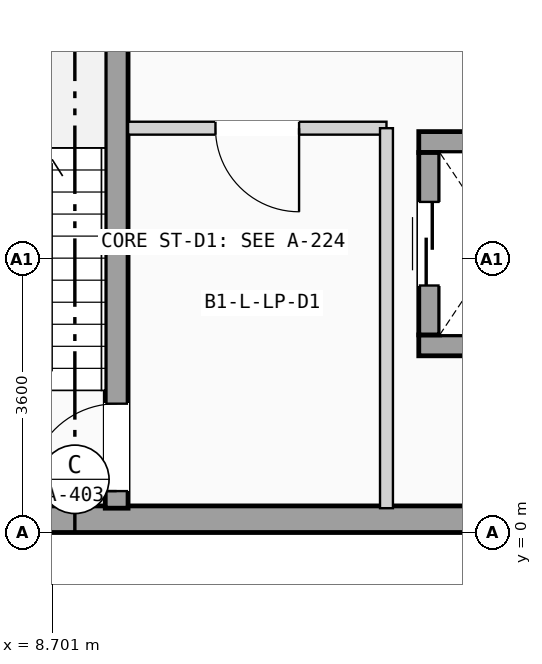
"""IFC4 building model, lengths in metres.
Left out: names, types, materials, properties, quantities, classifications, styles, units other than length and angle.
Written with IfcOpenShell. Run it as: python <this file> out.ifc"""

import sys

from ifc_helpers import new_model, si_unit, direction, frame, frame_2d, origin, place, context, subcontext, project, spatial, rectangle, extrude, element, fill, save


model = new_model("IFC4")
c1 = context("Model", 3, precision=1e-05, world=origin(), true_north=direction((0.0, 1.0)))
c2 = subcontext(c1, "Body", "Model", "MODEL_VIEW")
j1 = project(units=[si_unit("LENGTHUNIT", "METRE"), si_unit("PLANEANGLEUNIT", "RADIAN")], contexts=[c1])
p1 = place(None, origin())
s1 = spatial("IfcSite", under=j1, at=p1, CompositionType="ELEMENT")
p2 = place(p1, origin())
s2 = spatial("IfcBuilding", under=s1, at=p2, CompositionType="ELEMENT")
p3 = place(p2, frame((0.0, 0.0, -4.2)))
s3 = spatial("IfcBuildingStorey", under=s2, at=p3, CompositionType="ELEMENT", Elevation=-4.2)
p4 = place(p3, frame((0.0, 0.175, 0.0), z_axis=(0.0, 0.0, 1.0), x_axis=(1.0, 0.0, 0.0)))
e1 = element("IfcWall", 1, at=p4, inside=s3, PredefinedType="SOLIDWALL", context=c2, shape_type="SweptSolid", body=[
    extrude(rectangle(XDim=64.8, YDim=0.35, at=frame_2d((32.4, 0.0))), origin(), (0.0, 0.0, 1.0), 3.92),
])
p5 = place(p3, frame((9.55, 0.32, 0.0), z_axis=(0.0, 0.0, 1.0), x_axis=(0.0, 1.0, 0.0)))
e2 = element("IfcWall", 2, at=p5, inside=s3, PredefinedType="SHEAR", context=c2, shape_type="SweptSolid", body=[
    extrude(rectangle(XDim=7.0, YDim=0.3, at=frame_2d((3.5, 0.0))), origin(), (0.0, 0.0, 1.0), 3.92),
])
p6 = place(p5, frame((0.225, 0.0, 0.0)))
e3 = element("IfcOpeningElement", 3, at=p6, cuts=e2, PredefinedType="OPENING", context=c2, shape_type="SweptSolid", body=[
    extrude(rectangle(XDim=1.15, YDim=2.12, at=frame_2d((0.575, 1.06))), frame((0.0, 0.16, 0.0), z_axis=(0.0, -1.0, 0.0), x_axis=(1.0, 0.0, 0.0)), (0.0, 0.0, 1.0), 0.32),
])
for number, where, z_axis, x_axis in (
    (4, (13.525, 2.462, 0.0), (0.0, 0.0, 1.0), (1.0, 0.0, 0.0)),
    (5, (13.525, 5.137, 0.0), (0.0, 0.0, 1.0), (1.0, 0.0, 0.0)),
):
    element("IfcWall", number, at=place(p3, frame(where, z_axis=z_axis, x_axis=x_axis)), inside=s3, PredefinedType="SHEAR", context=c2, shape_type="SweptSolid", body=[
        extrude(rectangle(XDim=2.15, YDim=0.275, at=frame_2d((1.075, 0.0))), origin(), (0.0, 0.0, 1.0), 3.92),
    ])
p7 = place(p3, frame((13.663, 2.6, 0.0), z_axis=(0.0, 0.0, 1.0), x_axis=(0.0, 1.0, 0.0)))
e6 = element("IfcWall", 6, at=p7, inside=s3, PredefinedType="SHEAR", context=c2, shape_type="SweptSolid", body=[
    extrude(rectangle(XDim=2.4, YDim=0.275, at=frame_2d((1.2, 0.0))), origin(), (0.0, 0.0, 1.0), 3.92),
])
p8 = place(p7, frame((0.65, 0.0, 0.0)))
e7 = element("IfcOpeningElement", 7, at=p8, cuts=e6, PredefinedType="OPENING", context=c2, shape_type="SweptSolid", body=[
    extrude(rectangle(XDim=1.1, YDim=2.15, at=frame_2d((0.55, 1.075))), frame((0.0, 0.147, 0.0), z_axis=(0.0, -1.0, 0.0), x_axis=(1.0, 0.0, 0.0)), (0.0, 0.0, 1.0), 0.295),
])
p9 = place(p3, frame((9.7, 5.32, 0.0), z_axis=(0.0, 0.0, 1.0), x_axis=(1.0, 0.0, 0.0)))
e8 = element("IfcWall", 8, at=p9, inside=s3, PredefinedType="PARTITIONING", context=c2, shape_type="SweptSolid", body=[
    extrude(rectangle(XDim=3.4, YDim=0.17, at=frame_2d((1.7, 0.0))), origin(), (0.0, 0.0, 1.0), 3.84),
])
p10 = place(p9, frame((1.15, 0.0, 0.0)))
e9 = element("IfcOpeningElement", 9, at=p10, cuts=e8, PredefinedType="OPENING", context=c2, shape_type="SweptSolid", body=[
    extrude(rectangle(XDim=1.1, YDim=2.12, at=frame_2d((0.55, 1.06))), frame((0.0, 0.095, 0.0), z_axis=(0.0, -1.0, 0.0), x_axis=(1.0, 0.0, 0.0)), (0.0, 0.0, 1.0), 0.19),
])
p11 = place(p3, frame((13.1, 0.32, 0.0), z_axis=(0.0, 0.0, 1.0), x_axis=(0.0, 1.0, 0.0)))
e10 = element("IfcWall", 10, at=p11, inside=s3, PredefinedType="PARTITIONING", context=c2, shape_type="SweptSolid", body=[
    extrude(rectangle(XDim=5.0, YDim=0.17, at=frame_2d((2.5, 0.0))), origin(), (0.0, 0.0, 1.0), 3.84),
])
p12 = place(p6, origin())
e11 = element("IfcDoor", 11, at=p12, inside=s3, OperationType="SINGLE_SWING_LEFT", PredefinedType="DOOR", context=c2, shape_type="SweptSolid", body=[
    extrude(rectangle(XDim=1.15, YDim=2.12, at=frame_2d((0.575, 1.06))), frame((0.0, 0.025, 0.0), z_axis=(0.0, -1.0, 0.0), x_axis=(1.0, 0.0, 0.0)), (0.0, 0.0, 1.0), 0.05),
])
fill(e3, e11)
p13 = place(p8, origin())
e12 = element("IfcDoor", 12, at=p13, inside=s3, OperationType="SLIDING_TO_LEFT", PredefinedType="DOOR", context=c2, shape_type="SweptSolid", body=[
    extrude(rectangle(XDim=1.1, YDim=2.15, at=frame_2d((0.55, 1.075))), frame((0.0, 0.025, 0.0), z_axis=(0.0, -1.0, 0.0), x_axis=(1.0, 0.0, 0.0)), (0.0, 0.0, 1.0), 0.05),
])
fill(e7, e12)
p14 = place(p10, frame((1.1, 0.0, 0.0), z_axis=(0.0, 0.0, 1.0), x_axis=(-1.0, 0.0, 0.0)))
e13 = element("IfcDoor", 13, at=p14, inside=s3, OperationType="SINGLE_SWING_RIGHT", PredefinedType="DOOR", context=c2, shape_type="SweptSolid", body=[
    extrude(rectangle(XDim=1.1, YDim=2.12, at=frame_2d((0.55, 1.06))), frame((0.0, 0.025, 0.0), z_axis=(0.0, -1.0, 0.0), x_axis=(1.0, 0.0, 0.0)), (0.0, 0.0, 1.0), 0.05),
])
fill(e9, e13)
save(model, sys.argv[1])
